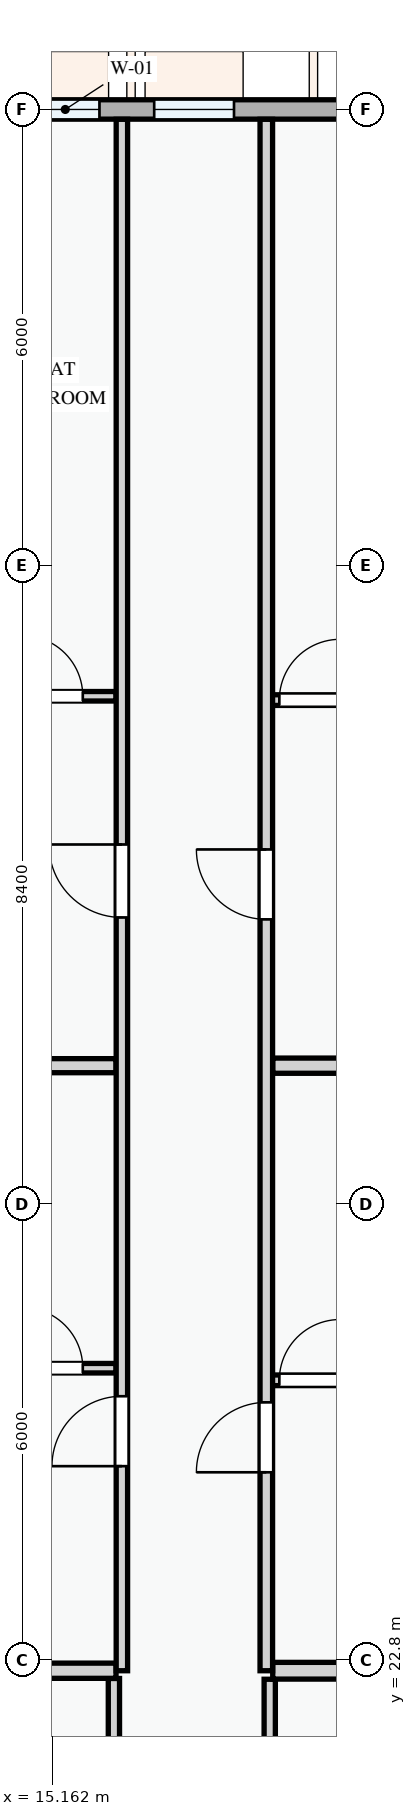
"""IFC4 building model, lengths in metres.
Left out: names, types, materials, properties, quantities, classifications, styles, units other than length and angle.
Written with IfcOpenShell. Run it as: python <this file> out.ifc"""

import sys

from ifc_helpers import new_model, si_unit, direction, frame, frame_2d, origin, place, context, subcontext, project, spatial, rectangle, extrude, element, fill, save


model = new_model("IFC4")
c1 = context("Model", 3, precision=1e-05, world=origin(), true_north=direction((0.0, 1.0)))
c2 = subcontext(c1, "Body", "Model", "MODEL_VIEW")
j1 = project(units=[si_unit("LENGTHUNIT", "METRE"), si_unit("PLANEANGLEUNIT", "RADIAN")], contexts=[c1])
p1 = place(None, origin())
s1 = spatial("IfcSite", under=j1, at=p1, CompositionType="ELEMENT")
p2 = place(p1, origin())
s2 = spatial("IfcBuilding", under=s1, at=p2, CompositionType="ELEMENT")
p3 = place(p2, frame((0.0, 0.0, 31.2)))
s3 = spatial("IfcBuildingStorey", under=s2, at=p3, CompositionType="ELEMENT", Elevation=31.2)
p4 = place(p3, frame((22.8, 43.2, 0.0), z_axis=(0.0, 0.0, 1.0), x_axis=(-1.0, 0.0, 0.0)))
e1 = element("IfcWall", 1, at=p4, inside=s3, PredefinedType="STANDARD", context=c2, shape_type="SweptSolid", body=[
    extrude(rectangle(XDim=8.4, YDim=0.255, at=frame_2d((4.2, 0.0))), origin(), (0.0, 0.0, 1.0), 2.375),
])
p5 = place(p4, frame((0.557, 0.0, 0.78)))
e2 = element("IfcOpeningElement", 2, at=p5, cuts=e1, PredefinedType="OPENING", context=c2, shape_type="SweptSolid", body=[
    extrude(rectangle(XDim=1.42, YDim=1.38, at=frame_2d((0.71, 0.69))), frame((0.0, 0.137, 0.0), z_axis=(0.0, -1.0, 0.0), x_axis=(1.0, 0.0, 0.0)), (0.0, 0.0, 1.0), 0.275),
])
p6 = place(p4, frame((5.245, 0.0, 0.78)))
e3 = element("IfcOpeningElement", 3, at=p6, cuts=e1, PredefinedType="OPENING", context=c2, shape_type="SweptSolid", body=[
    extrude(rectangle(XDim=1.05, YDim=1.2, at=frame_2d((0.525, 0.6))), frame((0.0, 0.137, 0.0), z_axis=(0.0, -1.0, 0.0), x_axis=(1.0, 0.0, 0.0)), (0.0, 0.0, 1.0), 0.275),
])
p7 = place(p4, frame((7.015, 0.0, 0.78)))
e4 = element("IfcOpeningElement", 4, at=p7, cuts=e1, PredefinedType="OPENING", context=c2, shape_type="SweptSolid", body=[
    extrude(rectangle(XDim=0.9, YDim=1.2, at=frame_2d((0.45, 0.6))), frame((0.0, 0.137, 0.0), z_axis=(0.0, -1.0, 0.0), x_axis=(1.0, 0.0, 0.0)), (0.0, 0.0, 1.0), 0.275),
])
p8 = place(p3, frame((15.975, 18.676, 0.0), z_axis=(0.0, 0.0, 1.0), x_axis=(0.0, 1.0, 0.0)))
e5 = element("IfcWall", 5, at=p8, inside=s3, PredefinedType="PARTITIONING", context=c2, shape_type="SweptSolid", body=[
    extrude(rectangle(XDim=3.882, YDim=0.148, at=frame_2d((1.941, 0.0))), origin(), (0.0, 0.0, 1.0), 3.0),
])
p9 = place(p3, frame((18.025, 18.676, 0.0), z_axis=(0.0, 0.0, 1.0), x_axis=(0.0, 1.0, 0.0)))
e6 = element("IfcWall", 6, at=p9, inside=s3, PredefinedType="PARTITIONING", context=c2, shape_type="SweptSolid", body=[
    extrude(rectangle(XDim=3.872, YDim=0.148, at=frame_2d((1.936, 0.0))), origin(), (0.0, 0.0, 1.0), 3.0),
])
p10 = place(p3, frame((8.53, 26.64, 0.0), z_axis=(0.0, 0.0, 1.0), x_axis=(1.0, 0.0, 0.0)))
e7 = element("IfcWall", 7, at=p10, inside=s3, PredefinedType="PARTITIONING", context=c2, shape_type="SweptSolid", body=[
    extrude(rectangle(XDim=7.473, YDim=0.125, at=frame_2d((3.737, 0.0))), origin(), (0.0, 0.0, 1.0), 3.0),
])
p11 = place(p10, frame((1.334, 0.0, 0.0)))
e8 = element("IfcOpeningElement", 8, at=p11, cuts=e7, PredefinedType="OPENING", context=c2, shape_type="SweptSolid", body=[
    extrude(rectangle(XDim=0.85, YDim=2.1, at=frame_2d((0.425, 1.05))), frame((0.0, 0.073, 0.0), z_axis=(0.0, -1.0, 0.0), x_axis=(1.0, 0.0, 0.0)), (0.0, 0.0, 1.0), 0.145),
])
p12 = place(p10, frame((4.23, 0.0, 0.0)))
e9 = element("IfcOpeningElement", 9, at=p12, cuts=e7, PredefinedType="OPENING", context=c2, shape_type="SweptSolid", body=[
    extrude(rectangle(XDim=0.85, YDim=2.1, at=frame_2d((0.425, 1.05))), frame((0.0, 0.073, 0.0), z_axis=(0.0, -1.0, 0.0), x_axis=(1.0, 0.0, 0.0)), (0.0, 0.0, 1.0), 0.145),
])
p13 = place(p10, frame((6.236, 0.0, 0.0)))
e10 = element("IfcOpeningElement", 10, at=p13, cuts=e7, PredefinedType="OPENING", context=c2, shape_type="SweptSolid", body=[
    extrude(rectangle(XDim=0.8, YDim=2.1, at=frame_2d((0.4, 1.05))), frame((0.0, 0.073, 0.0), z_axis=(0.0, -1.0, 0.0), x_axis=(1.0, 0.0, 0.0)), (0.0, 0.0, 1.0), 0.145),
])
p14 = place(p3, frame((17.98, 26.481, 0.0), z_axis=(0.0, 0.0, 1.0), x_axis=(1.0, 0.0, 0.0)))
e11 = element("IfcWall", 11, at=p14, inside=s3, PredefinedType="PARTITIONING", context=c2, shape_type="SweptSolid", body=[
    extrude(rectangle(XDim=4.69, YDim=0.14, at=frame_2d((2.345, 0.0))), origin(), (0.0, 0.0, 1.0), 3.0),
])
p15 = place(p14, frame((0.171, 0.0, 0.0)))
e12 = element("IfcOpeningElement", 12, at=p15, cuts=e11, PredefinedType="OPENING", context=c2, shape_type="SweptSolid", body=[
    extrude(rectangle(XDim=0.8, YDim=2.1, at=frame_2d((0.4, 1.05))), frame((0.0, 0.08, 0.0), z_axis=(0.0, -1.0, 0.0), x_axis=(1.0, 0.0, 0.0)), (0.0, 0.0, 1.0), 0.16),
])
p16 = place(p14, frame((1.384, 0.0, 0.0)))
e13 = element("IfcOpeningElement", 13, at=p16, cuts=e11, PredefinedType="OPENING", context=c2, shape_type="SweptSolid", body=[
    extrude(rectangle(XDim=0.85, YDim=2.1, at=frame_2d((0.425, 1.05))), frame((0.0, 0.08, 0.0), z_axis=(0.0, -1.0, 0.0), x_axis=(1.0, 0.0, 0.0)), (0.0, 0.0, 1.0), 0.16),
])
p17 = place(p14, frame((3.193, 0.0, 0.0)))
e14 = element("IfcOpeningElement", 14, at=p17, cuts=e11, PredefinedType="OPENING", context=c2, shape_type="SweptSolid", body=[
    extrude(rectangle(XDim=0.85, YDim=2.1, at=frame_2d((0.425, 1.05))), frame((0.0, 0.08, 0.0), z_axis=(0.0, -1.0, 0.0), x_axis=(1.0, 0.0, 0.0)), (0.0, 0.0, 1.0), 0.16),
])
p18 = place(p3, frame((8.53, 22.66, 0.0), z_axis=(0.0, 0.0, 1.0), x_axis=(1.0, 0.0, 0.0)))
e15 = element("IfcWall", 15, at=p18, inside=s3, PredefinedType="PARTITIONING", context=c2, shape_type="SweptSolid", body=[
    extrude(rectangle(XDim=7.473, YDim=0.2, at=frame_2d((3.737, 0.0))), origin(), (0.0, 0.0, 1.0), 2.375),
])
p19 = place(p3, frame((18.064, 22.66, 0.0), z_axis=(0.0, 0.0, 1.0), x_axis=(1.0, 0.0, 0.0)))
e16 = element("IfcWall", 16, at=p19, inside=s3, PredefinedType="PARTITIONING", context=c2, shape_type="SweptSolid", body=[
    extrude(rectangle(XDim=4.484, YDim=0.22, at=frame_2d((2.242, 0.0))), origin(), (0.0, 0.0, 1.0), 2.375),
])
p20 = place(p3, frame((8.53, 35.48, 0.0), z_axis=(0.0, 0.0, 1.0), x_axis=(1.0, 0.0, 0.0)))
e17 = element("IfcWall", 17, at=p20, inside=s3, PredefinedType="PARTITIONING", context=c2, shape_type="SweptSolid", body=[
    extrude(rectangle(XDim=7.473, YDim=0.125, at=frame_2d((3.737, 0.0))), origin(), (0.0, 0.0, 1.0), 3.0),
])
p21 = place(p20, frame((1.334, 0.0, 0.0)))
e18 = element("IfcOpeningElement", 18, at=p21, cuts=e17, PredefinedType="OPENING", context=c2, shape_type="SweptSolid", body=[
    extrude(rectangle(XDim=0.82, YDim=2.08, at=frame_2d((0.41, 1.04))), frame((0.0, 0.073, 0.0), z_axis=(0.0, -1.0, 0.0), x_axis=(1.0, 0.0, 0.0)), (0.0, 0.0, 1.0), 0.145),
])
p22 = place(p20, frame((4.23, 0.0, 0.0)))
e19 = element("IfcOpeningElement", 19, at=p22, cuts=e17, PredefinedType="OPENING", context=c2, shape_type="SweptSolid", body=[
    extrude(rectangle(XDim=0.85, YDim=2.1, at=frame_2d((0.425, 1.05))), frame((0.0, 0.073, 0.0), z_axis=(0.0, -1.0, 0.0), x_axis=(1.0, 0.0, 0.0)), (0.0, 0.0, 1.0), 0.145),
])
p23 = place(p20, frame((6.236, 0.0, 0.0)))
e20 = element("IfcOpeningElement", 20, at=p23, cuts=e17, PredefinedType="OPENING", context=c2, shape_type="SweptSolid", body=[
    extrude(rectangle(XDim=0.8, YDim=2.1, at=frame_2d((0.4, 1.05))), frame((0.0, 0.073, 0.0), z_axis=(0.0, -1.0, 0.0), x_axis=(1.0, 0.0, 0.0)), (0.0, 0.0, 1.0), 0.145),
])
p24 = place(p3, frame((17.98, 35.43, 0.0), z_axis=(0.0, 0.0, 1.0), x_axis=(1.0, 0.0, 0.0)))
e21 = element("IfcWall", 21, at=p24, inside=s3, PredefinedType="PARTITIONING", context=c2, shape_type="SweptSolid", body=[
    extrude(rectangle(XDim=4.76, YDim=0.14, at=frame_2d((2.38, 0.0))), origin(), (0.0, 0.0, 1.0), 3.0),
])
p25 = place(p24, frame((0.171, 0.0, 0.0)))
e22 = element("IfcOpeningElement", 22, at=p25, cuts=e21, PredefinedType="OPENING", context=c2, shape_type="SweptSolid", body=[
    extrude(rectangle(XDim=0.8, YDim=2.1, at=frame_2d((0.4, 1.05))), frame((0.0, 0.08, 0.0), z_axis=(0.0, -1.0, 0.0), x_axis=(1.0, 0.0, 0.0)), (0.0, 0.0, 1.0), 0.16),
])
p26 = place(p24, frame((1.384, 0.0, 0.0)))
e23 = element("IfcOpeningElement", 23, at=p26, cuts=e21, PredefinedType="OPENING", context=c2, shape_type="SweptSolid", body=[
    extrude(rectangle(XDim=0.82, YDim=2.08, at=frame_2d((0.41, 1.04))), frame((0.0, 0.08, 0.0), z_axis=(0.0, -1.0, 0.0), x_axis=(1.0, 0.0, 0.0)), (0.0, 0.0, 1.0), 0.16),
])
p27 = place(p24, frame((3.193, 0.0, 0.0)))
e24 = element("IfcOpeningElement", 24, at=p27, cuts=e21, PredefinedType="OPENING", context=c2, shape_type="SweptSolid", body=[
    extrude(rectangle(XDim=0.85, YDim=2.1, at=frame_2d((0.425, 1.05))), frame((0.0, 0.08, 0.0), z_axis=(0.0, -1.0, 0.0), x_axis=(1.0, 0.0, 0.0)), (0.0, 0.0, 1.0), 0.16),
])
p28 = place(p3, frame((8.53, 30.62, 0.0), z_axis=(0.0, 0.0, 1.0), x_axis=(1.0, 0.0, 0.0)))
e25 = element("IfcWall", 25, at=p28, inside=s3, PredefinedType="PARTITIONING", context=c2, shape_type="SweptSolid", body=[
    extrude(rectangle(XDim=7.473, YDim=0.185, at=frame_2d((3.737, 0.0))), origin(), (0.0, 0.0, 1.0), 3.0),
])
p29 = place(p3, frame((18.064, 30.62, 0.0), z_axis=(0.0, 0.0, 1.0), x_axis=(1.0, 0.0, 0.0)))
e26 = element("IfcWall", 26, at=p29, inside=s3, PredefinedType="PARTITIONING", context=c2, shape_type="SweptSolid", body=[
    extrude(rectangle(XDim=4.676, YDim=0.2, at=frame_2d((2.338, 0.0))), origin(), (0.0, 0.0, 1.0), 3.0),
])
p30 = place(p3, frame((16.08, 22.66, 0.0), z_axis=(0.0, 0.0, 1.0), x_axis=(0.0, 1.0, 0.0)))
e27 = element("IfcWall", 27, at=p30, inside=s3, PredefinedType="PARTITIONING", context=c2, shape_type="SweptSolid", body=[
    extrude(rectangle(XDim=20.411, YDim=0.15, at=frame_2d((10.205, 0.0))), origin(), (0.0, 0.0, 1.0), 3.0),
])
p31 = place(p30, frame((2.691, 0.0, 0.0)))
e28 = element("IfcOpeningElement", 28, at=p31, cuts=e27, PredefinedType="OPENING", context=c2, shape_type="SweptSolid", body=[
    extrude(rectangle(XDim=0.92, YDim=2.1, at=frame_2d((0.46, 1.05))), frame((0.0, 0.085, 0.0), z_axis=(0.0, -1.0, 0.0), x_axis=(1.0, 0.0, 0.0)), (0.0, 0.0, 1.0), 0.17),
])
p32 = place(p30, frame((9.91, 0.0, 0.0)))
e29 = element("IfcOpeningElement", 29, at=p32, cuts=e27, PredefinedType="OPENING", context=c2, shape_type="SweptSolid", body=[
    extrude(rectangle(XDim=0.96, YDim=2.12, at=frame_2d((0.48, 1.06))), frame((0.0, 0.085, 0.0), z_axis=(0.0, -1.0, 0.0), x_axis=(1.0, 0.0, 0.0)), (0.0, 0.0, 1.0), 0.17),
])
p33 = place(p3, frame((17.98, 22.66, 0.0), z_axis=(0.0, 0.0, 1.0), x_axis=(0.0, 1.0, 0.0)))
e30 = element("IfcWall", 30, at=p33, inside=s3, PredefinedType="PARTITIONING", context=c2, shape_type="SweptSolid", body=[
    extrude(rectangle(XDim=20.411, YDim=0.165, at=frame_2d((10.205, 0.0))), origin(), (0.0, 0.0, 1.0), 3.0),
])
p34 = place(p33, frame((2.611, 0.0, 0.0)))
e31 = element("IfcOpeningElement", 31, at=p34, cuts=e30, PredefinedType="OPENING", context=c2, shape_type="SweptSolid", body=[
    extrude(rectangle(XDim=0.92, YDim=2.1, at=frame_2d((0.46, 1.05))), frame((0.0, 0.093, 0.0), z_axis=(0.0, -1.0, 0.0), x_axis=(1.0, 0.0, 0.0)), (0.0, 0.0, 1.0), 0.185),
])
p35 = place(p33, frame((9.885, 0.0, 0.0)))
e32 = element("IfcOpeningElement", 32, at=p35, cuts=e30, PredefinedType="OPENING", context=c2, shape_type="SweptSolid", body=[
    extrude(rectangle(XDim=0.92, YDim=2.1, at=frame_2d((0.46, 1.05))), frame((0.0, 0.093, 0.0), z_axis=(0.0, -1.0, 0.0), x_axis=(1.0, 0.0, 0.0)), (0.0, 0.0, 1.0), 0.185),
])
p36 = place(p6, origin())
e33 = element("IfcWindow", 33, at=p36, inside=s3, PartitioningType="SINGLE_PANEL", PredefinedType="WINDOW", context=c2, shape_type="SweptSolid", body=[
    extrude(rectangle(XDim=1.05, YDim=1.2, at=frame_2d((0.525, 0.6))), frame((0.0, 0.03, 0.0), z_axis=(0.0, -1.0, 0.0), x_axis=(1.0, 0.0, 0.0)), (0.0, 0.0, 1.0), 0.06),
])
fill(e3, e33)
p37 = place(p7, origin())
e34 = element("IfcWindow", 34, at=p37, inside=s3, PartitioningType="SINGLE_PANEL", PredefinedType="WINDOW", context=c2, shape_type="SweptSolid", body=[
    extrude(rectangle(XDim=0.9, YDim=1.2, at=frame_2d((0.45, 0.6))), frame((0.0, 0.03, 0.0), z_axis=(0.0, -1.0, 0.0), x_axis=(1.0, 0.0, 0.0)), (0.0, 0.0, 1.0), 0.06),
])
fill(e4, e34)
p38 = place(p13, origin())
e35 = element("IfcDoor", 35, at=p38, inside=s3, OperationType="SINGLE_SWING_LEFT", PredefinedType="DOOR", context=c2, shape_type="SweptSolid", body=[
    extrude(rectangle(XDim=0.8, YDim=2.1, at=frame_2d((0.4, 1.05))), frame((0.0, 0.025, 0.0), z_axis=(0.0, -1.0, 0.0), x_axis=(1.0, 0.0, 0.0)), (0.0, 0.0, 1.0), 0.05),
])
fill(e10, e35)
p39 = place(p15, origin())
e36 = element("IfcDoor", 36, at=p39, inside=s3, OperationType="SINGLE_SWING_RIGHT", PredefinedType="DOOR", context=c2, shape_type="SweptSolid", body=[
    extrude(rectangle(XDim=0.8, YDim=2.1, at=frame_2d((0.4, 1.05))), frame((0.0, 0.025, 0.0), z_axis=(0.0, -1.0, 0.0), x_axis=(1.0, 0.0, 0.0)), (0.0, 0.0, 1.0), 0.05),
])
fill(e12, e36)
p40 = place(p23, origin())
e37 = element("IfcDoor", 37, at=p40, inside=s3, OperationType="SINGLE_SWING_LEFT", PredefinedType="DOOR", context=c2, shape_type="SweptSolid", body=[
    extrude(rectangle(XDim=0.8, YDim=2.1, at=frame_2d((0.4, 1.05))), frame((0.0, 0.025, 0.0), z_axis=(0.0, -1.0, 0.0), x_axis=(1.0, 0.0, 0.0)), (0.0, 0.0, 1.0), 0.05),
])
fill(e20, e37)
p41 = place(p25, origin())
e38 = element("IfcDoor", 38, at=p41, inside=s3, OperationType="SINGLE_SWING_RIGHT", PredefinedType="DOOR", context=c2, shape_type="SweptSolid", body=[
    extrude(rectangle(XDim=0.8, YDim=2.1, at=frame_2d((0.4, 1.05))), frame((0.0, 0.025, 0.0), z_axis=(0.0, -1.0, 0.0), x_axis=(1.0, 0.0, 0.0)), (0.0, 0.0, 1.0), 0.05),
])
fill(e22, e38)
p42 = place(p31, origin())
e39 = element("IfcDoor", 39, at=p42, inside=s3, OperationType="SINGLE_SWING_LEFT", PredefinedType="DOOR", context=c2, shape_type="SweptSolid", body=[
    extrude(rectangle(XDim=0.92, YDim=2.1, at=frame_2d((0.46, 1.05))), frame((0.0, 0.025, 0.0), z_axis=(0.0, -1.0, 0.0), x_axis=(1.0, 0.0, 0.0)), (0.0, 0.0, 1.0), 0.05),
])
fill(e28, e39)
p43 = place(p32, origin())
e40 = element("IfcDoor", 40, at=p43, inside=s3, OperationType="SINGLE_SWING_RIGHT", PredefinedType="DOOR", context=c2, shape_type="SweptSolid", body=[
    extrude(rectangle(XDim=0.96, YDim=2.12, at=frame_2d((0.48, 1.06))), frame((0.0, 0.025, 0.0), z_axis=(0.0, -1.0, 0.0), x_axis=(1.0, 0.0, 0.0)), (0.0, 0.0, 1.0), 0.05),
])
fill(e29, e40)
p44 = place(p34, origin())
e41 = element("IfcDoor", 41, at=p44, inside=s3, OperationType="SINGLE_SWING_LEFT", PredefinedType="DOOR", context=c2, shape_type="SweptSolid", body=[
    extrude(rectangle(XDim=0.92, YDim=2.1, at=frame_2d((0.46, 1.05))), frame((0.0, 0.025, 0.0), z_axis=(0.0, -1.0, 0.0), x_axis=(1.0, 0.0, 0.0)), (0.0, 0.0, 1.0), 0.05),
])
fill(e31, e41)
p45 = place(p35, origin())
e42 = element("IfcDoor", 42, at=p45, inside=s3, OperationType="SINGLE_SWING_RIGHT", PredefinedType="DOOR", context=c2, shape_type="SweptSolid", body=[
    extrude(rectangle(XDim=0.92, YDim=2.1, at=frame_2d((0.46, 1.05))), frame((0.0, 0.025, 0.0), z_axis=(0.0, -1.0, 0.0), x_axis=(1.0, 0.0, 0.0)), (0.0, 0.0, 1.0), 0.05),
])
fill(e32, e42)
save(model, sys.argv[1])
